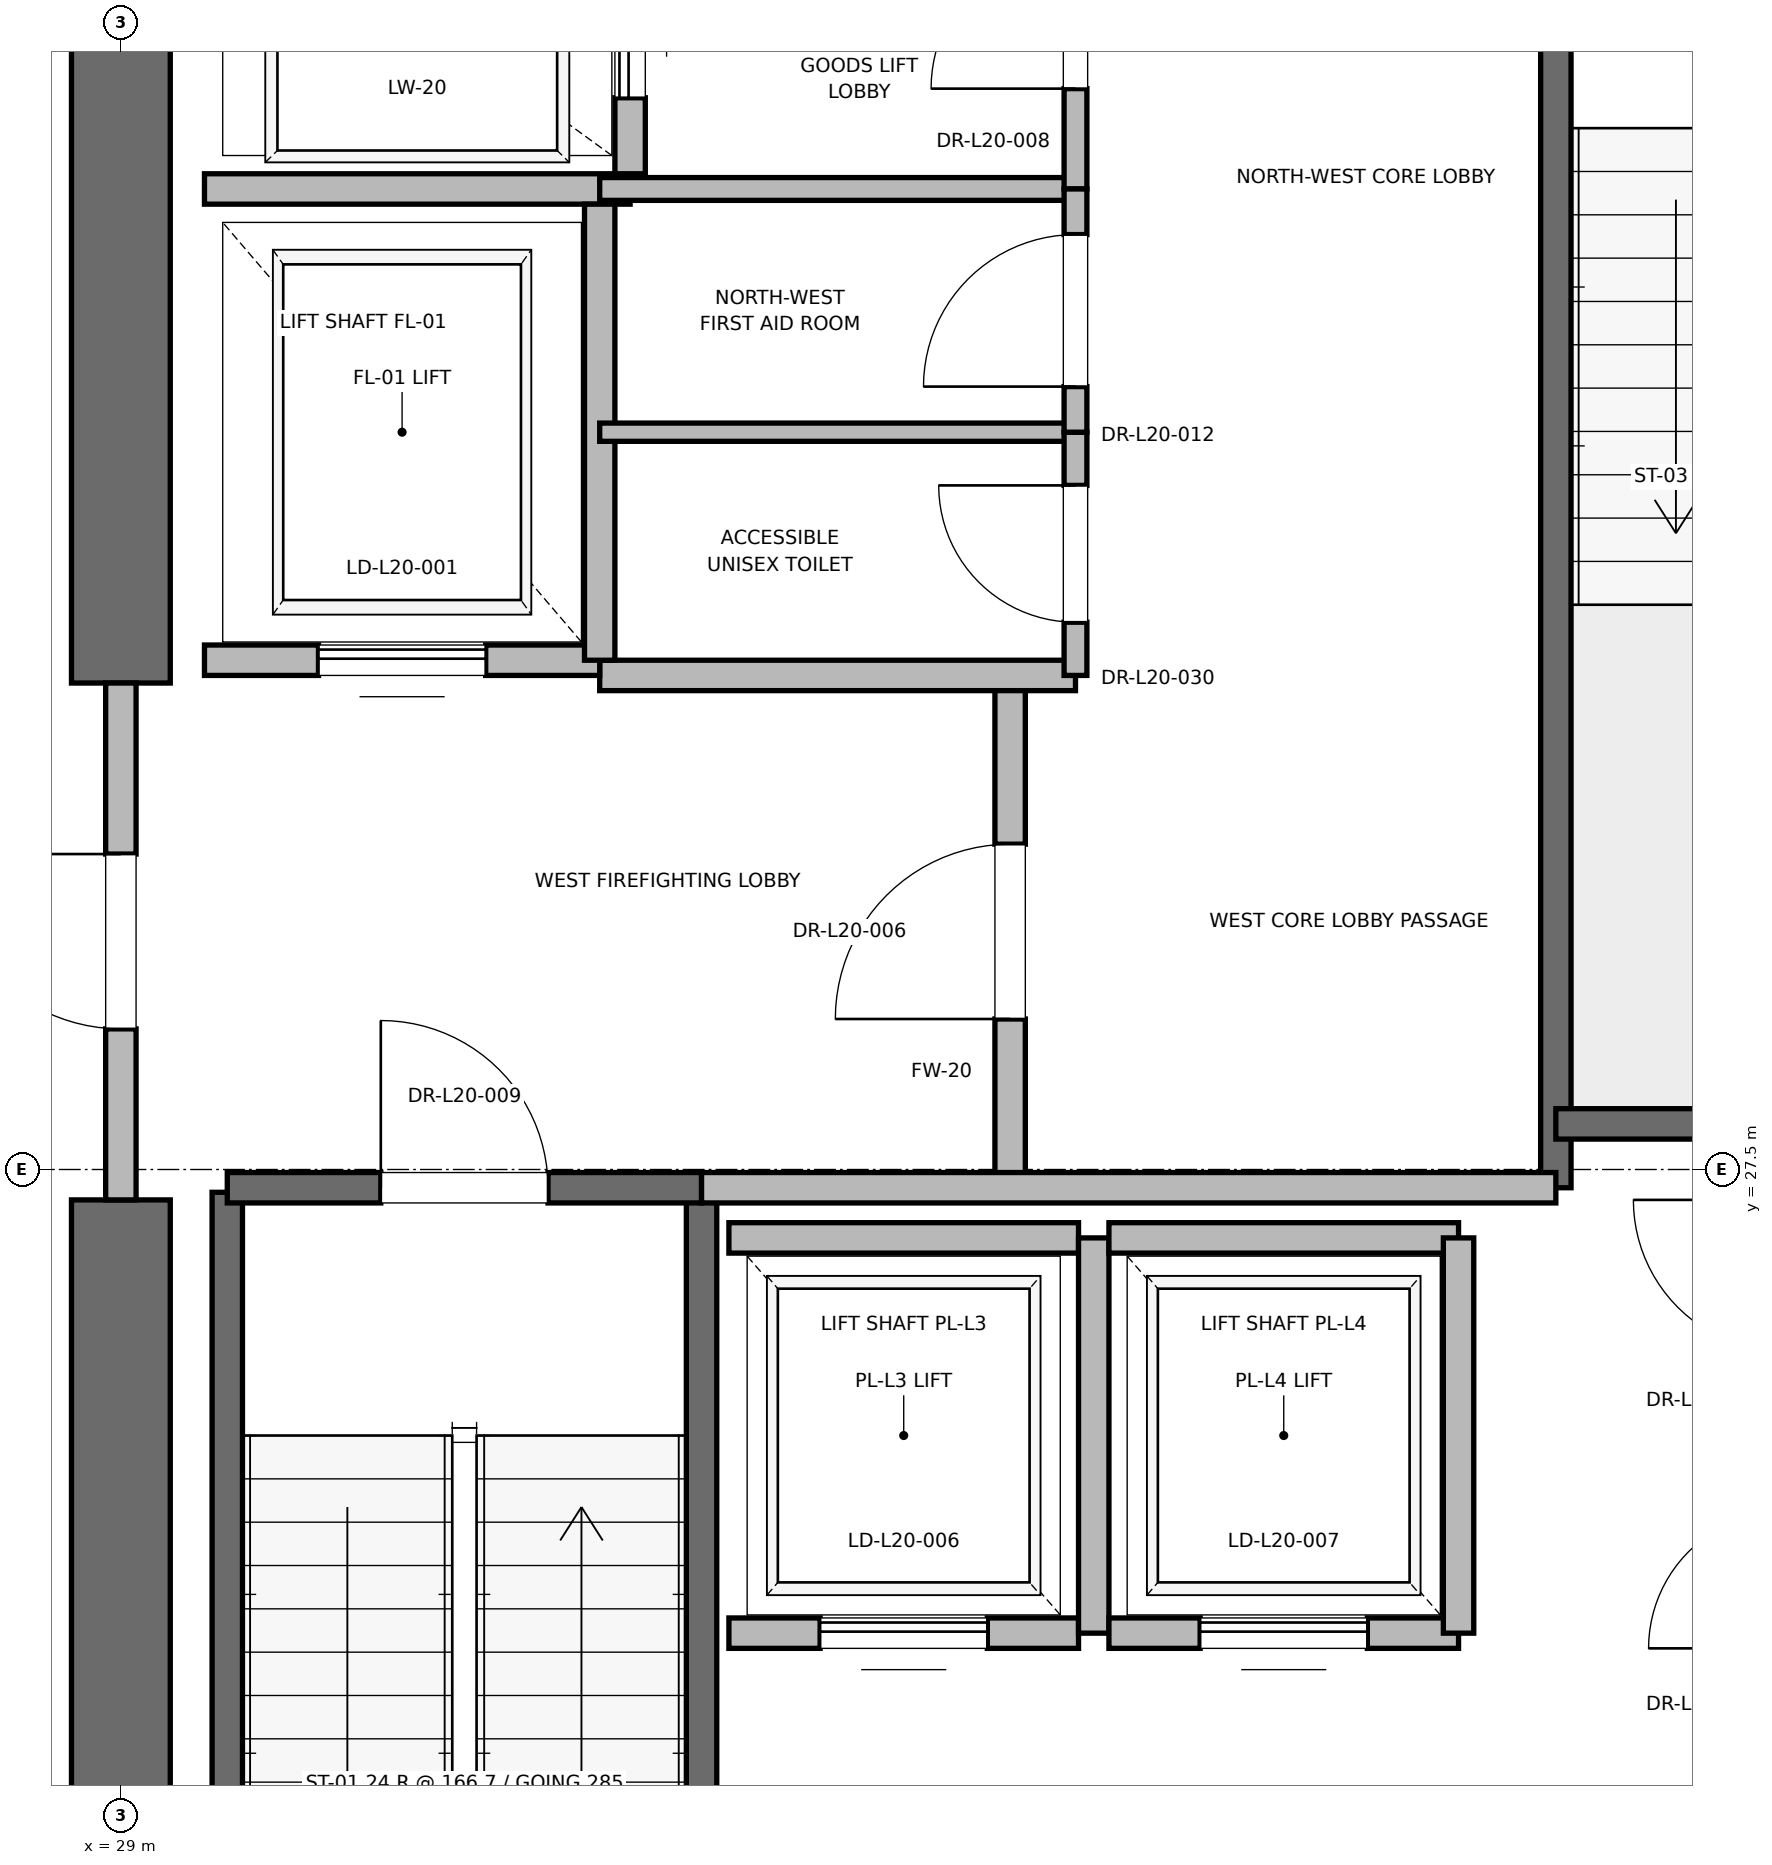
"""IFC4 building model, lengths in metres.
Left out: names, types, materials, properties, quantities, classifications, styles, units other than length and angle.
Written with IfcOpenShell. Run it as: python <this file> out.ifc"""

import sys

from ifc_helpers import new_model, si_unit, direction, frame, frame_2d, origin, place, context, subcontext, project, spatial, rectangle, extrude, element, fill, save


model = new_model("IFC4")
c1 = context("Model", 3, precision=1e-05, world=origin(), true_north=direction((0.0, 1.0)))
c2 = subcontext(c1, "Body", "Model", "MODEL_VIEW")
j1 = project(units=[si_unit("LENGTHUNIT", "METRE"), si_unit("PLANEANGLEUNIT", "RADIAN")], contexts=[c1])
p1 = place(None, origin())
s1 = spatial("IfcSite", under=j1, at=p1, CompositionType="ELEMENT")
p2 = place(p1, origin())
s2 = spatial("IfcBuilding", under=s1, at=p2, CompositionType="ELEMENT")
p3 = place(p2, frame((0.0, 0.0, 87.6)))
s3 = spatial("IfcBuildingStorey", under=s2, at=p3, CompositionType="ELEMENT", Elevation=87.6)
p4 = place(p3, frame((29.0, 18.5, 0.0), z_axis=(0.0, 0.0, 1.0), x_axis=(0.0, 1.0, 0.0)))
e1 = element("IfcWall", 1, at=p4, inside=s3, PredefinedType="SHEAR", context=c2, shape_type="SweptSolid", body=[
    extrude(rectangle(XDim=8.8, YDim=0.65, at=frame_2d((4.4, 0.0))), origin(), (0.0, 0.0, 1.0), 3.76),
])
p5 = place(p3, frame((29.0, 30.7, 0.0), z_axis=(0.0, 0.0, 1.0), x_axis=(0.0, 1.0, 0.0)))
e2 = element("IfcWall", 2, at=p5, inside=s3, PredefinedType="SHEAR", context=c2, shape_type="SweptSolid", body=[
    extrude(rectangle(XDim=5.8, YDim=0.65, at=frame_2d((2.9, 0.0))), origin(), (0.0, 0.0, 1.0), 3.76),
])
p6 = place(p3, frame((29.7, 19.2, 0.0), z_axis=(0.0, 0.0, 1.0), x_axis=(0.0, 1.0, 0.0)))
e3 = element("IfcWall", 3, at=p6, inside=s3, PredefinedType="SOLIDWALL", context=c2, shape_type="SweptSolid", body=[
    extrude(rectangle(XDim=8.15, YDim=0.2, at=frame_2d((4.075, 0.0))), origin(), (0.0, 0.0, 1.0), 3.76),
])
p7 = place(p3, frame((32.82, 18.6, 0.0), z_axis=(0.0, 0.0, 1.0), x_axis=(0.0, 1.0, 0.0)))
e4 = element("IfcWall", 4, at=p7, inside=s3, PredefinedType="SOLIDWALL", context=c2, shape_type="SweptSolid", body=[
    extrude(rectangle(XDim=8.78, YDim=0.2, at=frame_2d((4.39, 0.0))), origin(), (0.0, 0.0, 1.0), 3.76),
])
p8 = place(p3, frame((29.7, 27.38, 0.0), z_axis=(0.0, 0.0, 1.0), x_axis=(1.0, 0.0, 0.0)))
e5 = element("IfcWall", 5, at=p8, inside=s3, PredefinedType="SOLIDWALL", context=c2, shape_type="SweptSolid", body=[
    extrude(rectangle(XDim=3.12, YDim=0.2, at=frame_2d((1.56, 0.0))), origin(), (0.0, 0.0, 1.0), 3.76),
])
p9 = place(p8, frame((1.01, 0.0, 0.0)))
e6 = element("IfcOpeningElement", 6, at=p9, cuts=e5, PredefinedType="OPENING", context=c2, shape_type="SweptSolid", body=[
    extrude(rectangle(XDim=1.1, YDim=2.15, at=frame_2d((0.55, 1.075))), frame((0.0, 0.1, 0.0), z_axis=(0.0, -1.0, 0.0), x_axis=(1.0, 0.0, 0.0)), (0.0, 0.0, 1.0), 0.2),
])
p10 = place(p3, frame((38.44, 27.38, 0.0), z_axis=(0.0, 0.0, 1.0), x_axis=(0.0, 1.0, 0.0)))
e7 = element("IfcWall", 7, at=p10, inside=s3, PredefinedType="SOLIDWALL", context=c2, shape_type="SweptSolid", body=[
    extrude(rectangle(XDim=8.87, YDim=0.2, at=frame_2d((4.435, 0.0))), origin(), (0.0, 0.0, 1.0), 3.76),
])
p11 = place(p3, frame((38.44, 27.8, 0.0), z_axis=(0.0, 0.0, 1.0), x_axis=(1.0, 0.0, 0.0)))
e8 = element("IfcWall", 8, at=p11, inside=s3, PredefinedType="SOLIDWALL", context=c2, shape_type="SweptSolid", body=[
    extrude(rectangle(XDim=3.32, YDim=0.2, at=frame_2d((1.66, 0.0))), origin(), (0.0, 0.0, 1.0), 3.76),
])
p12 = place(p3, frame((34.85, 27.38, 0.0), z_axis=(0.0, 0.0, 1.0), x_axis=(0.0, 1.0, 0.0)))
e9 = element("IfcWall", 9, at=p12, inside=s3, PredefinedType="PARTITIONING", context=c2, shape_type="SweptSolid", body=[
    extrude(rectangle(XDim=3.37, YDim=0.2, at=frame_2d((1.685, 0.0))), origin(), (0.0, 0.0, 1.0), 3.76),
])
p13 = place(p12, frame((1.11, 0.0, 0.0)))
e10 = element("IfcOpeningElement", 10, at=p13, cuts=e9, PredefinedType="OPENING", context=c2, shape_type="SweptSolid", body=[
    extrude(rectangle(XDim=1.15, YDim=2.2, at=frame_2d((0.575, 1.1))), frame((0.0, 0.1, 0.0), z_axis=(0.0, -1.0, 0.0), x_axis=(1.0, 0.0, 0.0)), (0.0, 0.0, 1.0), 0.2),
])
p14 = place(p3, frame((29.0, 27.3, 0.0), z_axis=(0.0, 0.0, 1.0), x_axis=(0.0, 1.0, 0.0)))
e11 = element("IfcWall", 11, at=p14, inside=s3, PredefinedType="PARTITIONING", context=c2, shape_type="SweptSolid", body=[
    extrude(rectangle(XDim=3.4, YDim=0.2, at=frame_2d((1.7, 0.0))), origin(), (0.0, 0.0, 1.0), 2.54),
])
p15 = place(p14, frame((1.125, 0.0, 0.0)))
e12 = element("IfcOpeningElement", 12, at=p15, cuts=e11, PredefinedType="OPENING", context=c2, shape_type="SweptSolid", body=[
    extrude(rectangle(XDim=1.15, YDim=2.2, at=frame_2d((0.575, 1.1))), frame((0.0, 0.1, 0.0), z_axis=(0.0, -1.0, 0.0), x_axis=(1.0, 0.0, 0.0)), (0.0, 0.0, 1.0), 0.2),
])
p16 = place(p3, frame((32.82, 27.38, 0.0), z_axis=(0.0, 0.0, 1.0), x_axis=(1.0, 0.0, 0.0)))
e13 = element("IfcWall", 13, at=p16, inside=s3, PredefinedType="PARTITIONING", context=c2, shape_type="SweptSolid", body=[
    extrude(rectangle(XDim=5.62, YDim=0.2, at=frame_2d((2.81, 0.0))), origin(), (0.0, 0.0, 1.0), 3.76),
])
p17 = place(p3, frame((32.15, 30.75, 0.0), z_axis=(0.0, 0.0, 1.0), x_axis=(1.0, 0.0, 0.0)))
e14 = element("IfcWall", 14, at=p17, inside=s3, PredefinedType="PARTITIONING", context=c2, shape_type="SweptSolid", body=[
    extrude(rectangle(XDim=3.13, YDim=0.2, at=frame_2d((1.565, 0.0))), origin(), (0.0, 0.0, 1.0), 3.76),
])
p18 = place(p3, frame((29.55, 30.85, 0.0), z_axis=(0.0, 0.0, 1.0), x_axis=(1.0, 0.0, 0.0)))
e15 = element("IfcWall", 15, at=p18, inside=s3, PredefinedType="SOLIDWALL", context=c2, shape_type="SweptSolid", body=[
    extrude(rectangle(XDim=2.6, YDim=0.2, at=frame_2d((1.3, 0.0))), origin(), (0.0, 0.0, 1.0), 2.54),
])
p19 = place(p18, frame((0.75, 0.0, 0.0)))
e16 = element("IfcOpeningElement", 16, at=p19, cuts=e15, PredefinedType="OPENING", context=c2, shape_type="SweptSolid", body=[
    extrude(rectangle(XDim=1.1, YDim=2.2, at=frame_2d((0.55, 1.1))), frame((0.0, 0.1, 0.0), z_axis=(0.0, -1.0, 0.0), x_axis=(1.0, 0.0, 0.0)), (0.0, 0.0, 1.0), 0.2),
])
p20 = place(p3, frame((29.55, 33.95, 0.0), z_axis=(0.0, 0.0, 1.0), x_axis=(1.0, 0.0, 0.0)))
e17 = element("IfcWall", 17, at=p20, inside=s3, PredefinedType="SOLIDWALL", context=c2, shape_type="SweptSolid", body=[
    extrude(rectangle(XDim=2.8, YDim=0.2, at=frame_2d((1.4, 0.0))), origin(), (0.0, 0.0, 1.0), 3.76),
])
p21 = place(p3, frame((32.15, 30.85, 0.0), z_axis=(0.0, 0.0, 1.0), x_axis=(0.0, 1.0, 0.0)))
e18 = element("IfcWall", 18, at=p21, inside=s3, PredefinedType="SOLIDWALL", context=c2, shape_type="SweptSolid", body=[
    extrude(rectangle(XDim=3.0, YDim=0.2, at=frame_2d((1.5, 0.0))), origin(), (0.0, 0.0, 1.0), 3.76),
])
p22 = place(p3, frame((32.35, 34.05, 0.0), z_axis=(0.0, 0.0, 1.0), x_axis=(0.0, 1.0, 0.0)))
e19 = element("IfcWall", 19, at=p22, inside=s3, PredefinedType="SOLIDWALL", context=c2, shape_type="SweptSolid", body=[
    extrude(rectangle(XDim=2.1, YDim=0.2, at=frame_2d((1.05, 0.0))), origin(), (0.0, 0.0, 1.0), 3.76),
])
p23 = place(p22, frame((0.5, 0.0, 0.0)))
e20 = element("IfcOpeningElement", 20, at=p23, cuts=e19, PredefinedType="OPENING", context=c2, shape_type="SweptSolid", body=[
    extrude(rectangle(XDim=1.1, YDim=2.2, at=frame_2d((0.55, 1.1))), frame((0.0, 0.1, 0.0), z_axis=(0.0, -1.0, 0.0), x_axis=(1.0, 0.0, 0.0)), (0.0, 0.0, 1.0), 0.2),
])
p24 = place(p3, frame((33.0, 24.45, 0.0), z_axis=(0.0, 0.0, 1.0), x_axis=(1.0, 0.0, 0.0)))
e21 = element("IfcWall", 21, at=p24, inside=s3, PredefinedType="SOLIDWALL", context=c2, shape_type="SweptSolid", body=[
    extrude(rectangle(XDim=2.3, YDim=0.2, at=frame_2d((1.15, 0.0))), origin(), (0.0, 0.0, 1.0), 3.76),
])
p25 = place(p24, frame((0.6, 0.0, 0.0)))
e22 = element("IfcOpeningElement", 22, at=p25, cuts=e21, PredefinedType="OPENING", context=c2, shape_type="SweptSolid", body=[
    extrude(rectangle(XDim=1.1, YDim=2.2, at=frame_2d((0.55, 1.1))), frame((0.0, 0.1, 0.0), z_axis=(0.0, -1.0, 0.0), x_axis=(1.0, 0.0, 0.0)), (0.0, 0.0, 1.0), 0.2),
])
p26 = place(p3, frame((35.3, 27.05, 0.0), z_axis=(0.0, 0.0, 1.0), x_axis=(-1.0, 0.0, 0.0)))
e23 = element("IfcWall", 23, at=p26, inside=s3, PredefinedType="SOLIDWALL", context=c2, shape_type="SweptSolid", body=[
    extrude(rectangle(XDim=2.3, YDim=0.2, at=frame_2d((1.15, 0.0))), origin(), (0.0, 0.0, 1.0), 3.76),
])
p27 = place(p3, frame((35.4, 24.45, 0.0), z_axis=(0.0, 0.0, 1.0), x_axis=(0.0, 1.0, 0.0)))
e24 = element("IfcWall", 24, at=p27, inside=s3, PredefinedType="SOLIDWALL", context=c2, shape_type="SweptSolid", body=[
    extrude(rectangle(XDim=2.6, YDim=0.2, at=frame_2d((1.3, 0.0))), origin(), (0.0, 0.0, 1.0), 3.76),
])
p28 = place(p3, frame((35.5, 24.45, 0.0), z_axis=(0.0, 0.0, 1.0), x_axis=(1.0, 0.0, 0.0)))
e25 = element("IfcWall", 25, at=p28, inside=s3, PredefinedType="SOLIDWALL", context=c2, shape_type="SweptSolid", body=[
    extrude(rectangle(XDim=2.3, YDim=0.2, at=frame_2d((1.15, 0.0))), origin(), (0.0, 0.0, 1.0), 3.76),
])
p29 = place(p28, frame((0.6, 0.0, 0.0)))
e26 = element("IfcOpeningElement", 26, at=p29, cuts=e25, PredefinedType="OPENING", context=c2, shape_type="SweptSolid", body=[
    extrude(rectangle(XDim=1.1, YDim=2.2, at=frame_2d((0.55, 1.1))), frame((0.0, 0.1, 0.0), z_axis=(0.0, -1.0, 0.0), x_axis=(1.0, 0.0, 0.0)), (0.0, 0.0, 1.0), 0.2),
])
p30 = place(p3, frame((37.8, 27.05, 0.0), z_axis=(0.0, 0.0, 1.0), x_axis=(-1.0, 0.0, 0.0)))
e27 = element("IfcWall", 27, at=p30, inside=s3, PredefinedType="SOLIDWALL", context=c2, shape_type="SweptSolid", body=[
    extrude(rectangle(XDim=2.3, YDim=0.2, at=frame_2d((1.15, 0.0))), origin(), (0.0, 0.0, 1.0), 3.76),
])
p31 = place(p3, frame((37.8, 24.45, 0.0), z_axis=(0.0, 0.0, 1.0), x_axis=(0.0, 1.0, 0.0)))
e28 = element("IfcWall", 28, at=p31, inside=s3, PredefinedType="SOLIDWALL", context=c2, shape_type="SweptSolid", body=[
    extrude(rectangle(XDim=2.6, YDim=0.2, at=frame_2d((1.3, 0.0))), origin(), (0.0, 0.0, 1.0), 3.76),
])
p32 = place(p3, frame((32.15, 33.95, 0.0), z_axis=(0.0, 0.0, 1.0), x_axis=(1.0, 0.0, 0.0)))
e29 = element("IfcWall", 29, at=p32, inside=s3, PredefinedType="PARTITIONING", context=c2, shape_type="SweptSolid", body=[
    extrude(rectangle(XDim=3.13, YDim=0.15, at=frame_2d((1.565, 0.0))), origin(), (0.0, 0.0, 1.0), 2.85),
])
p33 = place(p3, frame((35.28, 33.95, 0.0), z_axis=(0.0, 0.0, 1.0), x_axis=(0.0, 1.0, 0.0)))
e30 = element("IfcWall", 30, at=p33, inside=s3, PredefinedType="PARTITIONING", context=c2, shape_type="SweptSolid", body=[
    extrude(rectangle(XDim=2.27, YDim=0.15, at=frame_2d((1.135, 0.0))), origin(), (0.0, 0.0, 1.0), 2.54),
])
p34 = place(p33, frame((0.66, 0.0, 0.0)))
e31 = element("IfcOpeningElement", 31, at=p34, cuts=e30, PredefinedType="OPENING", context=c2, shape_type="SweptSolid", body=[
    extrude(rectangle(XDim=0.95, YDim=2.15, at=frame_2d((0.475, 1.075))), frame((0.0, 0.075, 0.0), z_axis=(0.0, -1.0, 0.0), x_axis=(1.0, 0.0, 0.0)), (0.0, 0.0, 1.0), 0.15),
])
p35 = place(p3, frame((32.15, 32.35, 0.0), z_axis=(0.0, 0.0, 1.0), x_axis=(1.0, 0.0, 0.0)))
e32 = element("IfcWall", 32, at=p35, inside=s3, PredefinedType="PARTITIONING", context=c2, shape_type="SweptSolid", body=[
    extrude(rectangle(XDim=3.13, YDim=0.12, at=frame_2d((1.565, 0.0))), origin(), (0.0, 0.0, 1.0), 2.85),
])
p36 = place(p3, frame((35.28, 30.75, 0.0), z_axis=(0.0, 0.0, 1.0), x_axis=(0.0, 1.0, 0.0)))
e33 = element("IfcWall", 33, at=p36, inside=s3, PredefinedType="PARTITIONING", context=c2, shape_type="SweptSolid", body=[
    extrude(rectangle(XDim=1.6, YDim=0.15, at=frame_2d((0.8, 0.0))), origin(), (0.0, 0.0, 1.0), 2.85),
])
p37 = place(p36, frame((0.35, 0.0, 0.0)))
e34 = element("IfcOpeningElement", 34, at=p37, cuts=e33, PredefinedType="OPENING", context=c2, shape_type="SweptSolid", body=[
    extrude(rectangle(XDim=0.9, YDim=2.1, at=frame_2d((0.45, 1.05))), frame((0.0, 0.075, 0.0), z_axis=(0.0, -1.0, 0.0), x_axis=(1.0, 0.0, 0.0)), (0.0, 0.0, 1.0), 0.15),
])
p38 = place(p3, frame((35.28, 32.35, 0.0), z_axis=(0.0, 0.0, 1.0), x_axis=(0.0, 1.0, 0.0)))
e35 = element("IfcWall", 35, at=p38, inside=s3, PredefinedType="PARTITIONING", context=c2, shape_type="SweptSolid", body=[
    extrude(rectangle(XDim=1.6, YDim=0.15, at=frame_2d((0.8, 0.0))), origin(), (0.0, 0.0, 1.0), 2.85),
])
p39 = place(p38, frame((0.3, 0.0, 0.0)))
e36 = element("IfcOpeningElement", 36, at=p39, cuts=e35, PredefinedType="OPENING", context=c2, shape_type="SweptSolid", body=[
    extrude(rectangle(XDim=1.0, YDim=2.15, at=frame_2d((0.5, 1.075))), frame((0.0, 0.075, 0.0), z_axis=(0.0, -1.0, 0.0), x_axis=(1.0, 0.0, 0.0)), (0.0, 0.0, 1.0), 0.15),
])
p40 = place(p9, origin())
e37 = element("IfcDoor", 37, at=p40, inside=s3, OperationType="SINGLE_SWING_LEFT", PredefinedType="DOOR", context=c2, shape_type="SweptSolid", body=[
    extrude(rectangle(XDim=1.1, YDim=2.15, at=frame_2d((0.55, 1.075))), frame((0.0, 0.025, 0.0), z_axis=(0.0, -1.0, 0.0), x_axis=(1.0, 0.0, 0.0)), (0.0, 0.0, 1.0), 0.05),
])
fill(e6, e37)
p41 = place(p13, origin())
e38 = element("IfcDoor", 38, at=p41, inside=s3, OperationType="SINGLE_SWING_LEFT", PredefinedType="DOOR", context=c2, shape_type="SweptSolid", body=[
    extrude(rectangle(XDim=1.15, YDim=2.2, at=frame_2d((0.575, 1.1))), frame((0.0, 0.025, 0.0), z_axis=(0.0, -1.0, 0.0), x_axis=(1.0, 0.0, 0.0)), (0.0, 0.0, 1.0), 0.05),
])
fill(e10, e38)
p42 = place(p15, origin())
e39 = element("IfcDoor", 39, at=p42, inside=s3, OperationType="SINGLE_SWING_RIGHT", PredefinedType="DOOR", context=c2, shape_type="SweptSolid", body=[
    extrude(rectangle(XDim=1.15, YDim=2.2, at=frame_2d((0.575, 1.1))), frame((0.0, 0.025, 0.0), z_axis=(0.0, -1.0, 0.0), x_axis=(1.0, 0.0, 0.0)), (0.0, 0.0, 1.0), 0.05),
])
fill(e12, e39)
p43 = place(p19, origin())
e40 = element("IfcDoor", 40, at=p43, inside=s3, OperationType="SLIDING_TO_RIGHT", PredefinedType="DOOR", context=c2, shape_type="SweptSolid", body=[
    extrude(rectangle(XDim=1.1, YDim=2.2, at=frame_2d((0.55, 1.1))), frame((0.0, 0.025, 0.0), z_axis=(0.0, -1.0, 0.0), x_axis=(1.0, 0.0, 0.0)), (0.0, 0.0, 1.0), 0.05),
])
fill(e16, e40)
p44 = place(p23, origin())
e41 = element("IfcDoor", 41, at=p44, inside=s3, OperationType="SLIDING_TO_RIGHT", PredefinedType="DOOR", context=c2, shape_type="SweptSolid", body=[
    extrude(rectangle(XDim=1.1, YDim=2.2, at=frame_2d((0.55, 1.1))), frame((0.0, 0.025, 0.0), z_axis=(0.0, -1.0, 0.0), x_axis=(1.0, 0.0, 0.0)), (0.0, 0.0, 1.0), 0.05),
])
fill(e20, e41)
p45 = place(p25, origin())
e42 = element("IfcDoor", 42, at=p45, inside=s3, OperationType="SLIDING_TO_RIGHT", PredefinedType="DOOR", context=c2, shape_type="SweptSolid", body=[
    extrude(rectangle(XDim=1.1, YDim=2.2, at=frame_2d((0.55, 1.1))), frame((0.0, 0.025, 0.0), z_axis=(0.0, -1.0, 0.0), x_axis=(1.0, 0.0, 0.0)), (0.0, 0.0, 1.0), 0.05),
])
fill(e22, e42)
p46 = place(p29, origin())
e43 = element("IfcDoor", 43, at=p46, inside=s3, OperationType="SLIDING_TO_RIGHT", PredefinedType="DOOR", context=c2, shape_type="SweptSolid", body=[
    extrude(rectangle(XDim=1.1, YDim=2.2, at=frame_2d((0.55, 1.1))), frame((0.0, 0.025, 0.0), z_axis=(0.0, -1.0, 0.0), x_axis=(1.0, 0.0, 0.0)), (0.0, 0.0, 1.0), 0.05),
])
fill(e26, e43)
p47 = place(p34, origin())
e44 = element("IfcDoor", 44, at=p47, inside=s3, OperationType="SINGLE_SWING_LEFT", PredefinedType="DOOR", context=c2, shape_type="SweptSolid", body=[
    extrude(rectangle(XDim=0.95, YDim=2.15, at=frame_2d((0.475, 1.075))), frame((0.0, 0.025, 0.0), z_axis=(0.0, -1.0, 0.0), x_axis=(1.0, 0.0, 0.0)), (0.0, 0.0, 1.0), 0.05),
])
fill(e31, e44)
p48 = place(p37, origin())
e45 = element("IfcDoor", 45, at=p48, inside=s3, OperationType="SINGLE_SWING_RIGHT", PredefinedType="DOOR", context=c2, shape_type="SweptSolid", body=[
    extrude(rectangle(XDim=0.9, YDim=2.1, at=frame_2d((0.45, 1.05))), frame((0.0, 0.025, 0.0), z_axis=(0.0, -1.0, 0.0), x_axis=(1.0, 0.0, 0.0)), (0.0, 0.0, 1.0), 0.05),
])
fill(e34, e45)
p49 = place(p39, origin())
e46 = element("IfcDoor", 46, at=p49, inside=s3, OperationType="SINGLE_SWING_LEFT", PredefinedType="DOOR", context=c2, shape_type="SweptSolid", body=[
    extrude(rectangle(XDim=1.0, YDim=2.15, at=frame_2d((0.5, 1.075))), frame((0.0, 0.025, 0.0), z_axis=(0.0, -1.0, 0.0), x_axis=(1.0, 0.0, 0.0)), (0.0, 0.0, 1.0), 0.05),
])
fill(e36, e46)
save(model, sys.argv[1])
